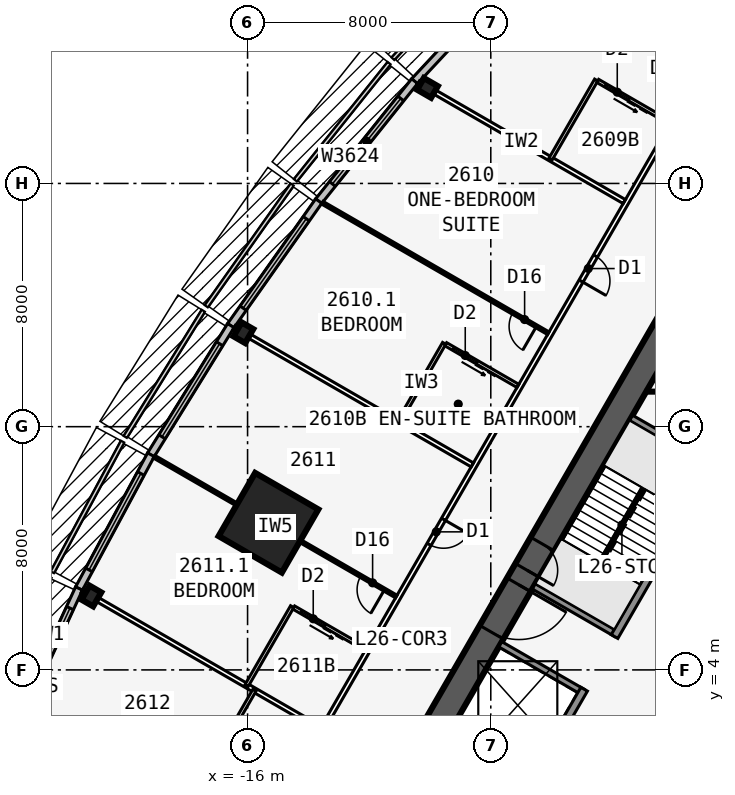
"""IFC4 building model, lengths in metres.
Left out: names, types, materials, properties, quantities, classifications, styles, units other than length and angle.
Written with IfcOpenShell. Run it as: python <this file> out.ifc"""

import sys

from ifc_helpers import new_model, si_unit, direction, frame, frame_2d, origin, origin_2d, place, context, subcontext, project, spatial, rectangle, i_section, extrude, element, fill, save


model = new_model("IFC4")
c1 = context("Model", 3, precision=1e-05, world=origin(), true_north=direction((0.0, 1.0)))
c2 = subcontext(c1, "Body", "Model", "MODEL_VIEW")
j1 = project(units=[si_unit("LENGTHUNIT", "METRE"), si_unit("PLANEANGLEUNIT", "RADIAN")], contexts=[c1])
p1 = place(None, origin())
s1 = spatial("IfcSite", under=j1, at=p1, CompositionType="ELEMENT")
p2 = place(p1, origin())
s2 = spatial("IfcBuilding", under=s1, at=p2, CompositionType="ELEMENT")
p3 = place(p2, frame((0.0, 0.0, 99.9)))
s3 = spatial("IfcBuildingStorey", under=s2, at=p3, CompositionType="ELEMENT", Elevation=99.9)
p4 = place(p3, frame((0.0, 19.052, 0.0), z_axis=(0.0, 0.0, 1.0), x_axis=(-0.499999749417, -0.866025548458, 0.0)))
e1 = element("IfcWall", 1, at=p4, inside=s3, PredefinedType="SHEAR", context=c2, shape_type="SweptSolid", body=[
    extrude(rectangle(XDim=33.0, YDim=0.9, at=frame_2d((16.5, 0.0))), origin(), (0.0, 0.0, 1.0), 3.4),
])
p5 = place(p4, frame((14.15, 0.0, 0.0)))
e2 = element("IfcOpeningElement", 2, at=p5, cuts=e1, PredefinedType="OPENING", context=c2, shape_type="SweptSolid", body=[
    extrude(rectangle(XDim=1.8, YDim=2.13, at=frame_2d((0.9, 1.065))), frame((0.0, 0.46, 0.0), z_axis=(0.0, -1.0, 0.0), x_axis=(1.0, 0.0, 0.0)), (0.0, 0.0, 1.0), 0.92),
])
p6 = place(p4, frame((12.6, 0.0, 0.0)))
e3 = element("IfcOpeningElement", 3, at=p6, cuts=e1, PredefinedType="OPENING", context=c2, shape_type="SweptSolid", body=[
    extrude(rectangle(XDim=1.0, YDim=2.13, at=frame_2d((0.5, 1.065))), frame((0.0, 0.46, 0.0), z_axis=(0.0, -1.0, 0.0), x_axis=(1.0, 0.0, 0.0)), (0.0, 0.0, 1.0), 0.92),
])
p7 = place(p3, frame((-0.062, 11.794, 0.0), z_axis=(0.0, 0.0, 1.0), x_axis=(-0.500006680225, -0.86602154692, 0.0)))
e4 = element("IfcWall", 4, at=p7, inside=s3, PredefinedType="SOLIDWALL", context=c2, shape_type="SweptSolid", body=[
    extrude(rectangle(XDim=7.733, YDim=0.25, at=frame_2d((3.866, 0.0))), origin(), (0.0, 0.0, 1.0), 3.15),
])
p8 = place(p3, frame((-4.929, 3.365, 0.0), z_axis=(0.0, 0.0, 1.0), x_axis=(-0.499991433582, -0.866030349552, 0.0)))
e5 = element("IfcWall", 5, at=p8, inside=s3, PredefinedType="SOLIDWALL", context=c2, shape_type="SweptSolid", body=[
    extrude(rectangle(XDim=10.633, YDim=0.25, at=frame_2d((5.316, 0.0))), origin(), (0.0, 0.0, 1.0), 3.15),
])
p9 = place(p8, frame((9.164, 0.0, 0.0)))
e6 = element("IfcOpeningElement", 6, at=p9, cuts=e5, PredefinedType="OPENING", context=c2, shape_type="SweptSolid", body=[
    extrude(rectangle(XDim=0.9, YDim=2.13, at=frame_2d((0.45, 1.065))), frame((0.0, 0.135, 0.0), z_axis=(0.0, -1.0, 0.0), x_axis=(1.0, 0.0, 0.0)), (0.0, 0.0, 1.0), 0.27),
])
for number, where, z_axis, x_axis in (
    (7, (-0.679, 10.727, 0.0), (0.0, 0.0, 1.0), (-0.866, 0.5, 0.0)),
    (8, (-3.879, 5.184, 0.0), (0.0, 0.0, 1.0), (-0.866, 0.5, 0.0)),
    (9, (-4.979, 3.279, 0.0), (0.0, 0.0, 1.0), (-0.866, 0.5, 0.0)),
):
    element("IfcWall", number, at=place(p3, frame(where, z_axis=z_axis, x_axis=x_axis)), inside=s3, PredefinedType="SOLIDWALL", context=c2, shape_type="SweptSolid", body=[
        extrude(rectangle(XDim=3.125, YDim=0.2, at=frame_2d((1.562, 0.0))), origin(), (0.0, 0.0, 1.0), 3.15),
    ])
for number, where, z_axis, x_axis in (
    (10, (-10.083, 23.142, 0.0), (0.0, 0.0, 1.0), (-0.5, -0.866, 0.0)),
    (11, (-16.137, 15.09, 0.0), (0.0, 0.0, 1.0), (-0.866, 0.5, 0.0)),
    (12, (-21.137, 6.43, 0.0), (0.0, 0.0, 1.0), (-0.866, 0.5, 0.0)),
):
    element("IfcColumn", number, at=place(p3, frame(where, z_axis=z_axis, x_axis=x_axis)), inside=s3, PredefinedType="COLUMN", context=c2, shape_type="SweptSolid", body=[
        extrude(i_section(OverallWidth=0.442, OverallDepth=0.531, WebThickness=0.066, FlangeThickness=0.106, at=origin_2d()), origin(), (0.0, 0.0, 1.0), 3.4),
    ])
p10 = place(p3, frame((-15.312, 8.84, 0.0), z_axis=(0.0, 0.0, 1.0), x_axis=(-0.866025403784, 0.5, 0.0)))
e13 = element("IfcColumn", 13, at=p10, inside=s3, PredefinedType="COLUMN", context=c2, shape_type="SweptSolid", body=[
    extrude(rectangle(XDim=2.4, YDim=2.4, at=origin_2d()), origin(), (0.0, 0.0, 1.0), 3.4),
])
p11 = place(p3, frame((-4.909, 29.36, 0.0), z_axis=(0.0, 0.0, 1.0), x_axis=(-0.682289646561, -0.731081964075, 0.0)))
e14 = element("IfcWall", 14, at=p11, inside=s3, PredefinedType="STANDARD", context=c2, shape_type="SweptSolid", body=[
    extrude(rectangle(XDim=8.211, YDim=0.25, at=frame_2d((4.105, 0.0))), origin(), (0.0, 0.0, 1.0), 3.15),
])
p12 = place(p11, frame((2.006, 0.0, 0.45)))
e15 = element("IfcOpeningElement", 15, at=p12, cuts=e14, PredefinedType="OPENING", context=c2, shape_type="SweptSolid", body=[
    extrude(rectangle(XDim=4.2, YDim=2.4, at=frame_2d((2.1, 1.2))), frame((0.0, 0.135, 0.0), z_axis=(0.0, -1.0, 0.0), x_axis=(1.0, 0.0, 0.0)), (0.0, 0.0, 1.0), 0.27),
])
p13 = place(p3, frame((-10.505, 23.364, 0.0), z_axis=(0.0, 0.0, 1.0), x_axis=(-0.624594965756, -0.780948864364, 0.0)))
e16 = element("IfcWall", 16, at=p13, inside=s3, PredefinedType="STANDARD", context=c2, shape_type="SweptSolid", body=[
    extrude(rectangle(XDim=5.058, YDim=0.25, at=frame_2d((2.529, 0.0))), origin(), (0.0, 0.0, 1.0), 3.15),
])
p14 = place(p13, frame((0.729, 0.0, 0.45)))
e17 = element("IfcOpeningElement", 17, at=p14, cuts=e16, PredefinedType="OPENING", context=c2, shape_type="SweptSolid", body=[
    extrude(rectangle(XDim=3.6, YDim=2.4, at=frame_2d((1.8, 1.2))), frame((0.0, 0.135, 0.0), z_axis=(0.0, -1.0, 0.0), x_axis=(1.0, 0.0, 0.0)), (0.0, 0.0, 1.0), 0.27),
])
p15 = place(p3, frame((-13.659, 19.42, 0.0), z_axis=(0.0, 0.0, 1.0), x_axis=(-0.5766431066, -0.81699616132, 0.0)))
e18 = element("IfcWall", 18, at=p15, inside=s3, PredefinedType="STANDARD", context=c2, shape_type="SweptSolid", body=[
    extrude(rectangle(XDim=5.021, YDim=0.25, at=frame_2d((2.51, 0.0))), origin(), (0.0, 0.0, 1.0), 3.15),
])
p16 = place(p15, frame((0.71, 0.0, 0.45)))
e19 = element("IfcOpeningElement", 19, at=p16, cuts=e18, PredefinedType="OPENING", context=c2, shape_type="SweptSolid", body=[
    extrude(rectangle(XDim=3.6, YDim=2.4, at=frame_2d((1.8, 1.2))), frame((0.0, 0.135, 0.0), z_axis=(0.0, -1.0, 0.0), x_axis=(1.0, 0.0, 0.0)), (0.0, 0.0, 1.0), 0.27),
])
p17 = place(p3, frame((-16.551, 15.324, 0.0), z_axis=(0.0, 0.0, 1.0), x_axis=(-0.526132807704, -0.850402415717, 0.0)))
e20 = element("IfcWall", 20, at=p17, inside=s3, PredefinedType="STANDARD", context=c2, shape_type="SweptSolid", body=[
    extrude(rectangle(XDim=5.002, YDim=0.25, at=frame_2d((2.501, 0.0))), origin(), (0.0, 0.0, 1.0), 3.15),
])
p18 = place(p17, frame((0.701, 0.0, 0.45)))
e21 = element("IfcOpeningElement", 21, at=p18, cuts=e20, PredefinedType="OPENING", context=c2, shape_type="SweptSolid", body=[
    extrude(rectangle(XDim=3.6, YDim=2.4, at=frame_2d((1.8, 1.2))), frame((0.0, 0.135, 0.0), z_axis=(0.0, -1.0, 0.0), x_axis=(1.0, 0.0, 0.0)), (0.0, 0.0, 1.0), 0.27),
])
p19 = place(p3, frame((-19.178, 11.077, 0.0), z_axis=(0.0, 0.0, 1.0), x_axis=(-0.473412820489, -0.880840678782, 0.0)))
e22 = element("IfcWall", 22, at=p19, inside=s3, PredefinedType="STANDARD", context=c2, shape_type="SweptSolid", body=[
    extrude(rectangle(XDim=5.002, YDim=0.25, at=frame_2d((2.501, 0.0))), origin(), (0.0, 0.0, 1.0), 3.15),
])
p20 = place(p19, frame((0.701, 0.0, 0.45)))
e23 = element("IfcOpeningElement", 23, at=p20, cuts=e22, PredefinedType="OPENING", context=c2, shape_type="SweptSolid", body=[
    extrude(rectangle(XDim=3.6, YDim=2.4, at=frame_2d((1.8, 1.2))), frame((0.0, 0.135, 0.0), z_axis=(0.0, -1.0, 0.0), x_axis=(1.0, 0.0, 0.0)), (0.0, 0.0, 1.0), 0.27),
])
p21 = place(p3, frame((-21.543, 6.678, 0.0), z_axis=(0.0, 0.0, 1.0), x_axis=(-0.419203100754, -0.907892482796, 0.0)))
e24 = element("IfcWall", 24, at=p21, inside=s3, PredefinedType="STANDARD", context=c2, shape_type="SweptSolid", body=[
    extrude(rectangle(XDim=5.021, YDim=0.25, at=frame_2d((2.51, 0.0))), origin(), (0.0, 0.0, 1.0), 3.15),
])
p22 = place(p21, frame((0.71, 0.0, 0.45)))
e25 = element("IfcOpeningElement", 25, at=p22, cuts=e24, PredefinedType="OPENING", context=c2, shape_type="SweptSolid", body=[
    extrude(rectangle(XDim=3.6, YDim=2.4, at=frame_2d((1.8, 1.2))), frame((0.0, 0.135, 0.0), z_axis=(0.0, -1.0, 0.0), x_axis=(1.0, 0.0, 0.0)), (0.0, 0.0, 1.0), 0.27),
])
p23 = place(p3, frame((-0.5, 24.636, 0.0), z_axis=(0.0, 0.0, 1.0), x_axis=(-0.500001915564, -0.86602429783, 0.0)))
e26 = element("IfcWall", 26, at=p23, inside=s3, PredefinedType="PARTITIONING", context=c2, shape_type="SweptSolid", body=[
    extrude(rectangle(XDim=42.172, YDim=0.15, at=frame_2d((21.086, 0.0))), origin(), (0.0, 0.0, 1.0), 3.15),
])
p24 = place(p23, frame((1.911, 0.0, 0.0)))
e27 = element("IfcOpeningElement", 27, at=p24, cuts=e26, PredefinedType="OPENING", context=c2, shape_type="SweptSolid", body=[
    extrude(rectangle(XDim=0.95, YDim=2.13, at=frame_2d((0.475, 1.065))), frame((0.0, 0.085, 0.0), z_axis=(0.0, -1.0, 0.0), x_axis=(1.0, 0.0, 0.0)), (0.0, 0.0, 1.0), 0.17),
])
p25 = place(p23, frame((8.111, 0.0, 0.0)))
e28 = element("IfcOpeningElement", 28, at=p25, cuts=e26, PredefinedType="OPENING", context=c2, shape_type="SweptSolid", body=[
    extrude(rectangle(XDim=0.95, YDim=2.13, at=frame_2d((0.475, 1.065))), frame((0.0, 0.085, 0.0), z_axis=(0.0, -1.0, 0.0), x_axis=(1.0, 0.0, 0.0)), (0.0, 0.0, 1.0), 0.17),
])
p26 = place(p23, frame((18.111, 0.0, 0.0)))
e29 = element("IfcOpeningElement", 29, at=p26, cuts=e26, PredefinedType="OPENING", context=c2, shape_type="SweptSolid", body=[
    extrude(rectangle(XDim=0.95, YDim=2.13, at=frame_2d((0.475, 1.065))), frame((0.0, 0.085, 0.0), z_axis=(0.0, -1.0, 0.0), x_axis=(1.0, 0.0, 0.0)), (0.0, 0.0, 1.0), 0.17),
])
p27 = place(p23, frame((28.711, 0.0, 0.0)))
e30 = element("IfcOpeningElement", 30, at=p27, cuts=e26, PredefinedType="OPENING", context=c2, shape_type="SweptSolid", body=[
    extrude(rectangle(XDim=0.95, YDim=2.13, at=frame_2d((0.475, 1.065))), frame((0.0, 0.085, 0.0), z_axis=(0.0, -1.0, 0.0), x_axis=(1.0, 0.0, 0.0)), (0.0, 0.0, 1.0), 0.17),
])
p28 = place(p23, frame((33.711, 0.0, 0.0)))
e31 = element("IfcOpeningElement", 31, at=p28, cuts=e26, PredefinedType="OPENING", context=c2, shape_type="SweptSolid", body=[
    extrude(rectangle(XDim=0.95, YDim=2.13, at=frame_2d((0.475, 1.065))), frame((0.0, 0.085, 0.0), z_axis=(0.0, -1.0, 0.0), x_axis=(1.0, 0.0, 0.0)), (0.0, 0.0, 1.0), 0.17),
])
p29 = place(p23, frame((39.311, 0.0, 0.0)))
e32 = element("IfcOpeningElement", 32, at=p29, cuts=e26, PredefinedType="OPENING", context=c2, shape_type="SweptSolid", body=[
    extrude(rectangle(XDim=0.95, YDim=2.13, at=frame_2d((0.475, 1.065))), frame((0.0, 0.085, 0.0), z_axis=(0.0, -1.0, 0.0), x_axis=(1.0, 0.0, 0.0)), (0.0, 0.0, 1.0), 0.17),
])
p30 = place(p3, frame((-3.608, 19.404, 0.0), z_axis=(0.0, 0.0, 1.0), x_axis=(-0.866021300503, 0.500007107024, 0.0)))
e33 = element("IfcWall", 33, at=p30, inside=s3, PredefinedType="PARTITIONING", context=c2, shape_type="SweptSolid", body=[
    extrude(rectangle(XDim=7.82, YDim=0.15, at=frame_2d((3.91, 0.0))), origin(), (0.0, 0.0, 1.0), 2.05),
])
p31 = place(p3, frame((-6.108, 15.073, 0.0), z_axis=(0.0, 0.0, 1.0), x_axis=(-0.866031196456, 0.499989966665, 0.0)))
e34 = element("IfcWall", 34, at=p31, inside=s3, PredefinedType="PARTITIONING", context=c2, shape_type="SweptSolid", body=[
    extrude(rectangle(XDim=8.585, YDim=0.1, at=frame_2d((4.292, 0.0))), origin(), (0.0, 0.0, 1.0), 2.109),
])
p32 = place(p31, frame((0.45, 0.0, 0.0)))
e35 = element("IfcOpeningElement", 35, at=p32, cuts=e34, PredefinedType="OPENING", context=c2, shape_type="SweptSolid", body=[
    extrude(rectangle(XDim=0.9, YDim=2.032, at=frame_2d((0.45, 1.016))), frame((0.0, 0.06, 0.0), z_axis=(0.0, -1.0, 0.0), x_axis=(1.0, 0.0, 0.0)), (0.0, 0.0, 1.0), 0.12),
])
p33 = place(p3, frame((-8.608, 10.743, 0.0), z_axis=(0.0, 0.0, 1.0), x_axis=(-0.866028232062, 0.499995101247, 0.0)))
e36 = element("IfcWall", 36, at=p33, inside=s3, PredefinedType="PARTITIONING", context=c2, shape_type="SweptSolid", body=[
    extrude(rectangle(XDim=9.043, YDim=0.15, at=frame_2d((4.521, 0.0))), origin(), (0.0, 0.0, 1.0), 2.05),
])
p34 = place(p3, frame((-11.108, 6.413, 0.0), z_axis=(0.0, 0.0, 1.0), x_axis=(-0.866022450903, 0.500005114506, 0.0)))
e37 = element("IfcWall", 37, at=p34, inside=s3, PredefinedType="PARTITIONING", context=c2, shape_type="SweptSolid", body=[
    extrude(rectangle(XDim=9.196, YDim=0.1, at=frame_2d((4.598, 0.0))), origin(), (0.0, 0.0, 1.0), 2.109),
])
p35 = place(p34, frame((0.45, 0.0, 0.0)))
e38 = element("IfcOpeningElement", 38, at=p35, cuts=e37, PredefinedType="OPENING", context=c2, shape_type="SweptSolid", body=[
    extrude(rectangle(XDim=0.9, YDim=2.032, at=frame_2d((0.45, 1.016))), frame((0.0, 0.06, 0.0), z_axis=(0.0, -1.0, 0.0), x_axis=(1.0, 0.0, 0.0)), (0.0, 0.0, 1.0), 0.12),
])
p36 = place(p3, frame((-13.608, 2.083, 0.0), z_axis=(0.0, 0.0, 1.0), x_axis=(-0.866028232062, 0.499995101247, 0.0)))
e39 = element("IfcWall", 39, at=p36, inside=s3, PredefinedType="PARTITIONING", context=c2, shape_type="SweptSolid", body=[
    extrude(rectangle(XDim=9.043, YDim=0.15, at=frame_2d((4.521, 0.0))), origin(), (0.0, 0.0, 1.0), 2.05),
])
p37 = place(p3, frame((-4.533, 23.402, 0.0), z_axis=(0.0, 0.0, 1.0), x_axis=(-0.499990139034, -0.866031096941, 0.0)))
e40 = element("IfcWall", 40, at=p37, inside=s3, PredefinedType="PLUMBINGWALL", context=c2, shape_type="SweptSolid", body=[
    extrude(rectangle(XDim=3.0, YDim=0.12, at=frame_2d((1.5, 0.0))), origin(), (0.0, 0.0, 1.0), 3.15),
])
p38 = place(p3, frame((-2.108, 22.002, 0.0), z_axis=(0.0, 0.0, 1.0), x_axis=(-0.866035715982, 0.499982138324, 0.0)))
e41 = element("IfcWall", 41, at=p38, inside=s3, PredefinedType="PLUMBINGWALL", context=c2, shape_type="SweptSolid", body=[
    extrude(rectangle(XDim=2.74, YDim=0.12, at=frame_2d((1.37, 0.0))), origin(), (0.0, 0.0, 1.0), 3.15),
])
p39 = place(p38, frame((1.55, 0.0, 0.0)))
e42 = element("IfcOpeningElement", 42, at=p39, cuts=e41, PredefinedType="OPENING", context=c2, shape_type="SweptSolid", body=[
    extrude(rectangle(XDim=0.9, YDim=2.13, at=frame_2d((0.45, 1.065))), frame((0.0, 0.07, 0.0), z_axis=(0.0, -1.0, 0.0), x_axis=(1.0, 0.0, 0.0)), (0.0, 0.0, 1.0), 0.14),
])
p40 = place(p3, frame((-9.533, 14.741, 0.0), z_axis=(0.0, 0.0, 1.0), x_axis=(-0.50002537861, -0.866010750942, 0.0)))
e43 = element("IfcWall", 43, at=p40, inside=s3, PredefinedType="PLUMBINGWALL", context=c2, shape_type="SweptSolid", body=[
    extrude(rectangle(XDim=3.0, YDim=0.12, at=frame_2d((1.5, 0.0))), origin(), (0.0, 0.0, 1.0), 3.15),
])
p41 = place(p3, frame((-7.108, 13.341, 0.0), z_axis=(0.0, 0.0, 1.0), x_axis=(-0.866035715982, 0.499982138324, 0.0)))
e44 = element("IfcWall", 44, at=p41, inside=s3, PredefinedType="PLUMBINGWALL", context=c2, shape_type="SweptSolid", body=[
    extrude(rectangle(XDim=2.74, YDim=0.12, at=frame_2d((1.37, 0.0))), origin(), (0.0, 0.0, 1.0), 3.15),
])
p42 = place(p41, frame((1.55, 0.0, 0.0)))
e45 = element("IfcOpeningElement", 45, at=p42, cuts=e44, PredefinedType="OPENING", context=c2, shape_type="SweptSolid", body=[
    extrude(rectangle(XDim=0.9, YDim=2.13, at=frame_2d((0.45, 1.065))), frame((0.0, 0.07, 0.0), z_axis=(0.0, -1.0, 0.0), x_axis=(1.0, 0.0, 0.0)), (0.0, 0.0, 1.0), 0.14),
])
p43 = place(p3, frame((-14.533, 6.081, 0.0), z_axis=(0.0, 0.0, 1.0), x_axis=(-0.499990139034, -0.866031096941, 0.0)))
e46 = element("IfcWall", 46, at=p43, inside=s3, PredefinedType="PLUMBINGWALL", context=c2, shape_type="SweptSolid", body=[
    extrude(rectangle(XDim=3.0, YDim=0.12, at=frame_2d((1.5, 0.0))), origin(), (0.0, 0.0, 1.0), 3.15),
])
p44 = place(p3, frame((-12.108, 4.681, 0.0), z_axis=(0.0, 0.0, 1.0), x_axis=(-0.866035715982, 0.499982138324, 0.0)))
e47 = element("IfcWall", 47, at=p44, inside=s3, PredefinedType="PLUMBINGWALL", context=c2, shape_type="SweptSolid", body=[
    extrude(rectangle(XDim=2.74, YDim=0.12, at=frame_2d((1.37, 0.0))), origin(), (0.0, 0.0, 1.0), 3.15),
])
p45 = place(p44, frame((1.55, 0.0, 0.0)))
e48 = element("IfcOpeningElement", 48, at=p45, cuts=e47, PredefinedType="OPENING", context=c2, shape_type="SweptSolid", body=[
    extrude(rectangle(XDim=0.9, YDim=2.13, at=frame_2d((0.45, 1.065))), frame((0.0, 0.07, 0.0), z_axis=(0.0, -1.0, 0.0), x_axis=(1.0, 0.0, 0.0)), (0.0, 0.0, 1.0), 0.14),
])
p46 = place(p3, frame((-15.773, 3.333, 0.0), z_axis=(0.0, 0.0, 1.0), x_axis=(-0.500001309137, -0.866024647952, 0.0)))
e49 = element("IfcWall", 49, at=p46, inside=s3, PredefinedType="PLUMBINGWALL", context=c2, shape_type="SweptSolid", body=[
    extrude(rectangle(XDim=2.4, YDim=0.12, at=frame_2d((1.2, 0.0))), origin(), (0.0, 0.0, 1.0), 3.15),
])
p47 = place(p3, frame((-2.887, 13.153, 0.0), z_axis=(0.0, 0.0, 1.0), x_axis=(1.0, 0.0, 0.0)))
e50 = element("IfcWall", 50, at=p47, inside=s3, PredefinedType="PARTITIONING", context=c2, shape_type="SweptSolid", body=[
    extrude(rectangle(XDim=5.773, YDim=0.1, at=frame_2d((2.887, 0.0))), origin(), (0.0, 0.0, 1.0), 3.15),
])
p48 = place(p47, frame((2.437, 0.0, 0.0)))
e51 = element("IfcOpeningElement", 51, at=p48, cuts=e50, PredefinedType="OPENING", context=c2, shape_type="SweptSolid", body=[
    extrude(rectangle(XDim=0.9, YDim=2.13, at=frame_2d((0.45, 1.065))), frame((0.0, 0.06, 0.0), z_axis=(0.0, -1.0, 0.0), x_axis=(1.0, 0.0, 0.0)), (0.0, 0.0, 1.0), 0.12),
])
p49 = place(p3, frame((-2.988, 9.978, 0.0), z_axis=(0.0, 0.0, 1.0), x_axis=(-0.499992232847, -0.866029888106, 0.0)))
e52 = element("IfcWall", 52, at=p49, inside=s3, PredefinedType="SOLIDWALL", context=c2, shape_type="SweptSolid", body=[
    extrude(rectangle(XDim=2.794, YDim=0.1, at=frame_2d((1.397, 0.0))), origin(), (0.0, 0.0, 1.0), 3.4),
])
p50 = place(p14, origin())
e53 = element("IfcWindow", 53, at=p50, inside=s3, PartitioningType="SINGLE_PANEL", PredefinedType="WINDOW", context=c2, shape_type="SweptSolid", body=[
    extrude(rectangle(XDim=3.6, YDim=2.4, at=frame_2d((1.8, 1.2))), frame((0.0, 0.03, 0.0), z_axis=(0.0, -1.0, 0.0), x_axis=(1.0, 0.0, 0.0)), (0.0, 0.0, 1.0), 0.06),
])
fill(e17, e53)
p51 = place(p16, origin())
e54 = element("IfcWindow", 54, at=p51, inside=s3, PartitioningType="SINGLE_PANEL", PredefinedType="WINDOW", context=c2, shape_type="SweptSolid", body=[
    extrude(rectangle(XDim=3.6, YDim=2.4, at=frame_2d((1.8, 1.2))), frame((0.0, 0.03, 0.0), z_axis=(0.0, -1.0, 0.0), x_axis=(1.0, 0.0, 0.0)), (0.0, 0.0, 1.0), 0.06),
])
fill(e19, e54)
p52 = place(p18, origin())
e55 = element("IfcWindow", 55, at=p52, inside=s3, PartitioningType="SINGLE_PANEL", PredefinedType="WINDOW", context=c2, shape_type="SweptSolid", body=[
    extrude(rectangle(XDim=3.6, YDim=2.4, at=frame_2d((1.8, 1.2))), frame((0.0, 0.03, 0.0), z_axis=(0.0, -1.0, 0.0), x_axis=(1.0, 0.0, 0.0)), (0.0, 0.0, 1.0), 0.06),
])
fill(e21, e55)
p53 = place(p20, origin())
e56 = element("IfcWindow", 56, at=p53, inside=s3, PartitioningType="SINGLE_PANEL", PredefinedType="WINDOW", context=c2, shape_type="SweptSolid", body=[
    extrude(rectangle(XDim=3.6, YDim=2.4, at=frame_2d((1.8, 1.2))), frame((0.0, 0.03, 0.0), z_axis=(0.0, -1.0, 0.0), x_axis=(1.0, 0.0, 0.0)), (0.0, 0.0, 1.0), 0.06),
])
fill(e23, e56)
p54 = place(p22, origin())
e57 = element("IfcWindow", 57, at=p54, inside=s3, PartitioningType="SINGLE_PANEL", PredefinedType="WINDOW", context=c2, shape_type="SweptSolid", body=[
    extrude(rectangle(XDim=3.6, YDim=2.4, at=frame_2d((1.8, 1.2))), frame((0.0, 0.03, 0.0), z_axis=(0.0, -1.0, 0.0), x_axis=(1.0, 0.0, 0.0)), (0.0, 0.0, 1.0), 0.06),
])
fill(e25, e57)
p55 = place(p32, origin())
e58 = element("IfcDoor", 58, at=p55, inside=s3, OperationType="SINGLE_SWING_LEFT", PredefinedType="DOOR", context=c2, shape_type="SweptSolid", body=[
    extrude(rectangle(XDim=0.9, YDim=2.032, at=frame_2d((0.45, 1.016))), frame((0.0, 0.025, 0.0), z_axis=(0.0, -1.0, 0.0), x_axis=(1.0, 0.0, 0.0)), (0.0, 0.0, 1.0), 0.05),
])
fill(e35, e58)
p56 = place(p35, origin())
e59 = element("IfcDoor", 59, at=p56, inside=s3, OperationType="SINGLE_SWING_LEFT", PredefinedType="DOOR", context=c2, shape_type="SweptSolid", body=[
    extrude(rectangle(XDim=0.9, YDim=2.032, at=frame_2d((0.45, 1.016))), frame((0.0, 0.025, 0.0), z_axis=(0.0, -1.0, 0.0), x_axis=(1.0, 0.0, 0.0)), (0.0, 0.0, 1.0), 0.05),
])
fill(e38, e59)
p57 = place(p39, origin())
e60 = element("IfcDoor", 60, at=p57, inside=s3, OperationType="SLIDING_TO_LEFT", PredefinedType="DOOR", context=c2, shape_type="SweptSolid", body=[
    extrude(rectangle(XDim=0.9, YDim=2.13, at=frame_2d((0.45, 1.065))), frame((0.0, 0.025, 0.0), z_axis=(0.0, -1.0, 0.0), x_axis=(1.0, 0.0, 0.0)), (0.0, 0.0, 1.0), 0.05),
])
fill(e42, e60)
p58 = place(p25, origin())
e61 = element("IfcDoor", 61, at=p58, inside=s3, OperationType="SINGLE_SWING_RIGHT", PredefinedType="DOOR", context=c2, shape_type="SweptSolid", body=[
    extrude(rectangle(XDim=0.95, YDim=2.13, at=frame_2d((0.475, 1.065))), frame((0.0, 0.025, 0.0), z_axis=(0.0, -1.0, 0.0), x_axis=(1.0, 0.0, 0.0)), (0.0, 0.0, 1.0), 0.05),
])
fill(e28, e61)
p59 = place(p42, origin())
e62 = element("IfcDoor", 62, at=p59, inside=s3, OperationType="SLIDING_TO_LEFT", PredefinedType="DOOR", context=c2, shape_type="SweptSolid", body=[
    extrude(rectangle(XDim=0.9, YDim=2.13, at=frame_2d((0.45, 1.065))), frame((0.0, 0.025, 0.0), z_axis=(0.0, -1.0, 0.0), x_axis=(1.0, 0.0, 0.0)), (0.0, 0.0, 1.0), 0.05),
])
fill(e45, e62)
p60 = place(p26, origin())
e63 = element("IfcDoor", 63, at=p60, inside=s3, OperationType="SINGLE_SWING_LEFT", PredefinedType="DOOR", context=c2, shape_type="SweptSolid", body=[
    extrude(rectangle(XDim=0.95, YDim=2.13, at=frame_2d((0.475, 1.065))), frame((0.0, 0.025, 0.0), z_axis=(0.0, -1.0, 0.0), x_axis=(1.0, 0.0, 0.0)), (0.0, 0.0, 1.0), 0.05),
])
fill(e29, e63)
p61 = place(p45, origin())
e64 = element("IfcDoor", 64, at=p61, inside=s3, OperationType="SLIDING_TO_LEFT", PredefinedType="DOOR", context=c2, shape_type="SweptSolid", body=[
    extrude(rectangle(XDim=0.9, YDim=2.13, at=frame_2d((0.45, 1.065))), frame((0.0, 0.025, 0.0), z_axis=(0.0, -1.0, 0.0), x_axis=(1.0, 0.0, 0.0)), (0.0, 0.0, 1.0), 0.05),
])
fill(e48, e64)
p62 = place(p5, origin())
e65 = element("IfcDoor", 65, at=p62, inside=s3, OperationType="DOUBLE_DOOR_SINGLE_SWING", PredefinedType="DOOR", context=c2, shape_type="SweptSolid", body=[
    extrude(rectangle(XDim=1.8, YDim=2.13, at=frame_2d((0.9, 1.065))), frame((0.0, 0.025, 0.0), z_axis=(0.0, -1.0, 0.0), x_axis=(1.0, 0.0, 0.0)), (0.0, 0.0, 1.0), 0.05),
])
fill(e2, e65)
p63 = place(p6, origin())
e66 = element("IfcDoor", 66, at=p63, inside=s3, OperationType="SINGLE_SWING_RIGHT", PredefinedType="DOOR", context=c2, shape_type="SweptSolid", body=[
    extrude(rectangle(XDim=1.0, YDim=2.13, at=frame_2d((0.5, 1.065))), frame((0.0, 0.025, 0.0), z_axis=(0.0, -1.0, 0.0), x_axis=(1.0, 0.0, 0.0)), (0.0, 0.0, 1.0), 0.05),
])
fill(e3, e66)
save(model, sys.argv[1])
